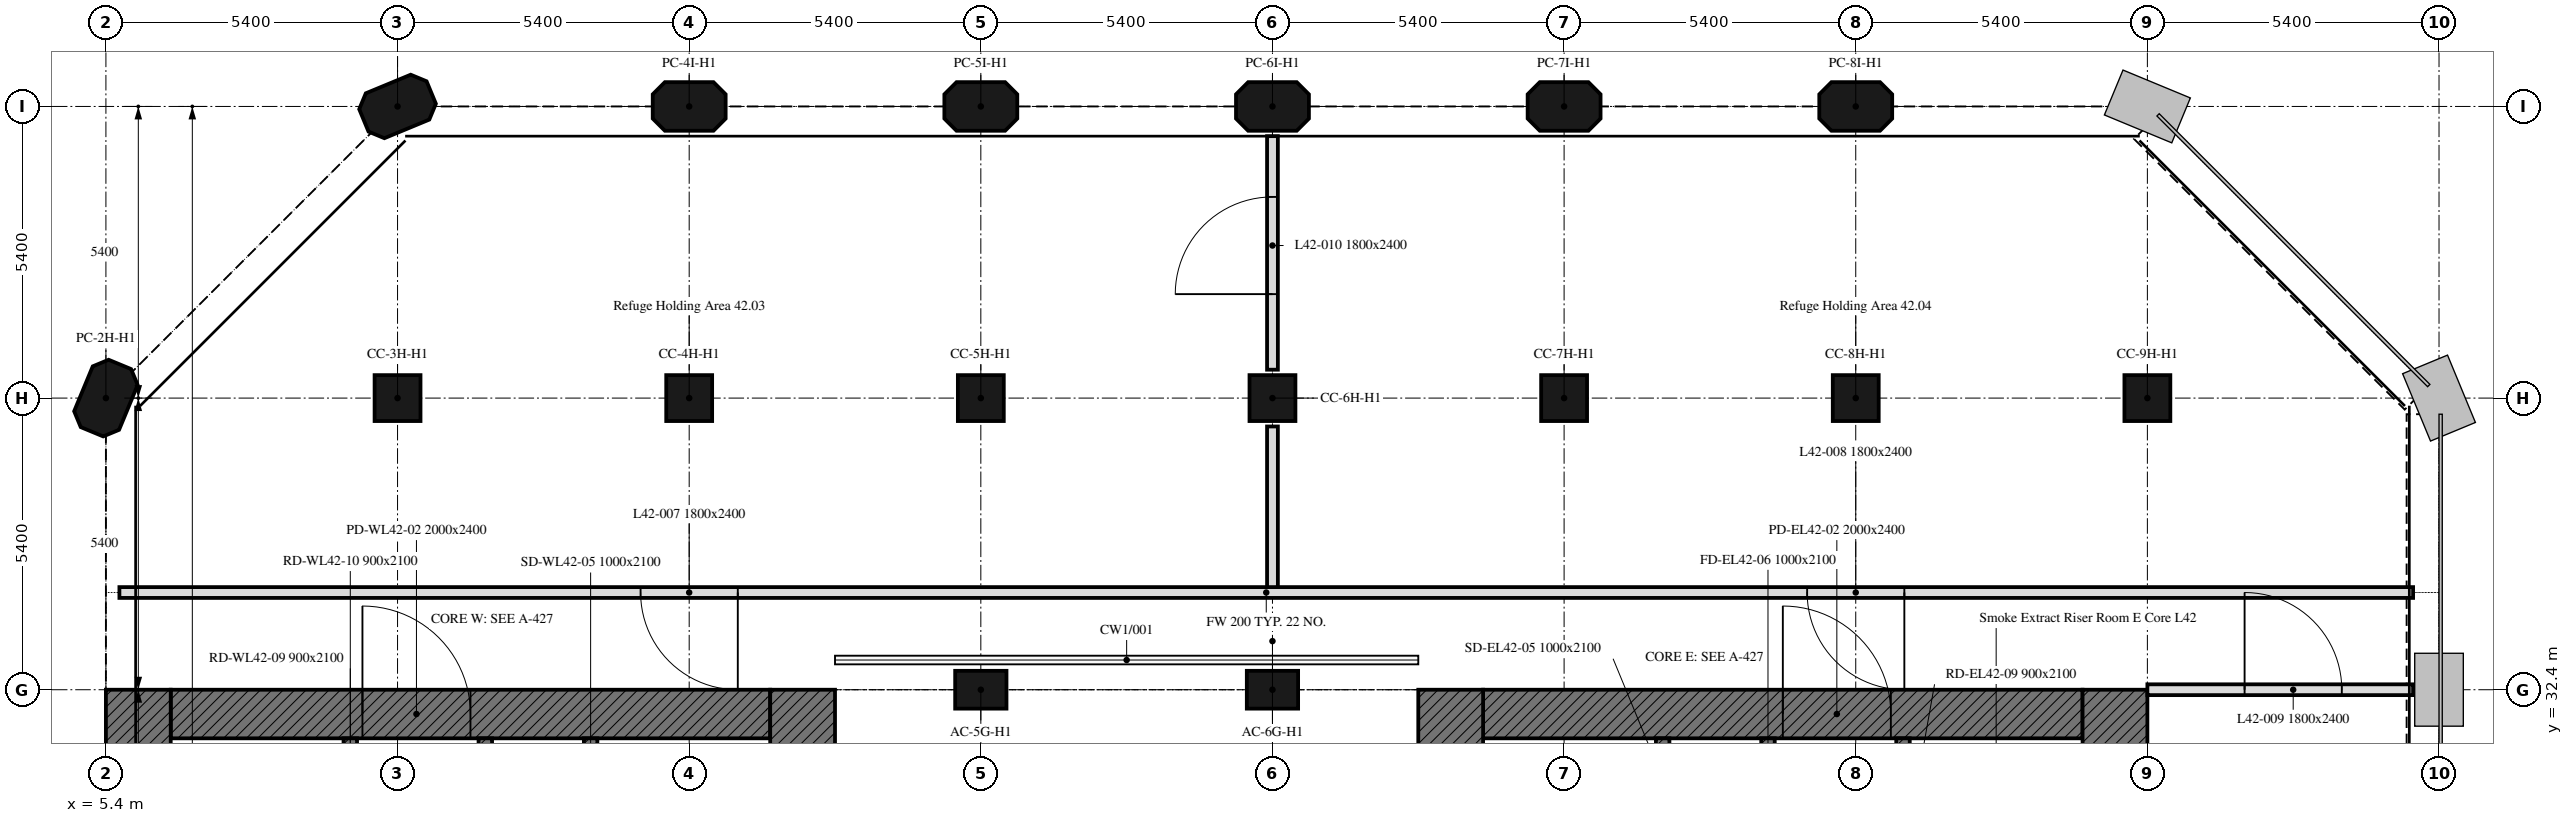
"""IFC4 building model, lengths in metres.
Left out: names, types, materials, properties, quantities, classifications, styles, units other than length and angle.
Written with IfcOpenShell. Run it as: python <this file> out.ifc"""

import sys

from ifc_helpers import new_model, si_unit, direction, frame, frame_2d, origin, origin_2d, place, context, subcontext, project, spatial, polyline, rectangle, outline, extrude, element, fill, save


model = new_model("IFC4")
c1 = context("Model", 3, precision=1e-05, world=origin(), true_north=direction((0.0, 1.0)))
c2 = subcontext(c1, "Body", "Model", "MODEL_VIEW")
j1 = project(units=[si_unit("LENGTHUNIT", "METRE"), si_unit("PLANEANGLEUNIT", "RADIAN")], contexts=[c1])
p1 = place(None, origin())
s1 = spatial("IfcSite", under=j1, at=p1, CompositionType="ELEMENT")
p2 = place(p1, origin())
s2 = spatial("IfcBuilding", under=s1, at=p2, CompositionType="ELEMENT")
p3 = place(p2, frame((0.0, 0.0, 175.9)))
s3 = spatial("IfcBuildingStorey", under=s2, at=p3, CompositionType="ELEMENT", Elevation=175.9)
for number, where, z_axis, x_axis in (
    (1, (21.6, 32.4, 0.0), (0.0, 0.0, 1.0), (1.0, 0.0, 0.0)),
    (2, (27.0, 32.4, 0.0), (0.0, 0.0, 1.0), (1.0, 0.0, 0.0)),
):
    element("IfcColumn", number, at=place(p3, frame(where, z_axis=z_axis, x_axis=x_axis)), inside=s3, PredefinedType="COLUMN", context=c2, shape_type="SweptSolid", body=[
        extrude(rectangle(XDim=0.95, YDim=0.7, at=origin_2d()), origin(), (0.0, 0.0, 1.0), 4.5),
    ])
p4 = place(p3, frame((5.4, 37.8, 0.0), z_axis=(0.0, 0.0, 1.0), x_axis=(0.382683432365, 0.923879532511, 0.0)))
e3 = element("IfcColumn", 3, at=p4, inside=s3, PredefinedType="COLUMN", context=c2, shape_type="SweptSolid", body=[
    extrude(outline(polyline([(-0.45, -0.45), (0.45, -0.45), (0.675, -0.225), (0.675, 0.225), (0.45, 0.45), (-0.45, 0.45), (-0.675, 0.225), (-0.675, -0.225), (-0.45, -0.45)])), origin(), (0.0, 0.0, 1.0), 4.5),
])
for number, where, z_axis, x_axis in (
    (4, (10.8, 37.8, 0.0), (0.0, 0.0, 1.0), (1.0, 0.0, 0.0)),
    (5, (16.2, 37.8, 0.0), (0.0, 0.0, 1.0), (1.0, 0.0, 0.0)),
    (6, (21.6, 37.8, 0.0), (0.0, 0.0, 1.0), (1.0, 0.0, 0.0)),
    (7, (27.0, 37.8, 0.0), (0.0, 0.0, 1.0), (1.0, 0.0, 0.0)),
    (8, (32.4, 37.8, 0.0), (0.0, 0.0, 1.0), (1.0, 0.0, 0.0)),
    (9, (37.8, 37.8, 0.0), (0.0, 0.0, 1.0), (1.0, 0.0, 0.0)),
    (10, (43.2, 37.8, 0.0), (0.0, 0.0, 1.0), (1.0, 0.0, 0.0)),
):
    element("IfcColumn", number, at=place(p3, frame(where, z_axis=z_axis, x_axis=x_axis)), inside=s3, PredefinedType="COLUMN", context=c2, shape_type="SweptSolid", body=[
        extrude(rectangle(XDim=0.85, YDim=0.85, at=origin_2d()), origin(), (0.0, 0.0, 1.0), 4.5),
    ])
for number, where, z_axis, x_axis in (
    (11, (10.8, 43.2, 0.0), (0.0, 0.0, 1.0), (0.924, 0.383, 0.0)),
    (12, (16.2, 43.2, 0.0), (0.0, 0.0, 1.0), (1.0, 0.0, 0.0)),
    (13, (21.6, 43.2, 0.0), (0.0, 0.0, 1.0), (1.0, 0.0, 0.0)),
    (14, (27.0, 43.2, 0.0), (0.0, 0.0, 1.0), (1.0, 0.0, 0.0)),
    (15, (32.4, 43.2, 0.0), (0.0, 0.0, 1.0), (1.0, 0.0, 0.0)),
    (16, (37.8, 43.2, 0.0), (0.0, 0.0, 1.0), (1.0, 0.0, 0.0)),
):
    element("IfcColumn", number, at=place(p3, frame(where, z_axis=z_axis, x_axis=x_axis)), inside=s3, PredefinedType="COLUMN", context=c2, shape_type="SweptSolid", body=[
        extrude(outline(polyline([(-0.45, -0.45), (0.45, -0.45), (0.675, -0.225), (0.675, 0.225), (0.45, 0.45), (-0.45, 0.45), (-0.675, 0.225), (-0.675, -0.225), (-0.45, -0.45)])), origin(), (0.0, 0.0, 1.0), 4.5),
    ])
p5 = place(p3, frame((6.6, 31.95, 0.0), z_axis=(0.0, 0.0, 1.0), x_axis=(1.0, 0.0, 0.0)))
e17 = element("IfcWall", 17, at=p5, inside=s3, PredefinedType="SOLIDWALL", context=c2, shape_type="SweptSolid", body=[
    extrude(rectangle(XDim=11.1, YDim=0.9, at=frame_2d((5.55, 0.0))), origin(), (0.0, 0.0, 1.0), 4.5),
])
p6 = place(p5, frame((3.55, 0.0, 0.0)))
e18 = element("IfcOpeningElement", 18, at=p6, cuts=e17, PredefinedType="OPENING", context=c2, shape_type="SweptSolid", body=[
    extrude(rectangle(XDim=2.0, YDim=2.4, at=frame_2d((1.0, 1.2))), frame((0.0, 0.45, 0.0), z_axis=(0.0, -1.0, 0.0), x_axis=(1.0, 0.0, 0.0)), (0.0, 0.0, 1.0), 0.9),
])
for number, where, z_axis, x_axis in (
    (19, (6.0, 16.2, 0.0), (0.0, 0.0, 1.0), (0.0, 1.0, 0.0)),
    (20, (18.3, 32.4, 0.0), (0.0, 0.0, 1.0), (0.0, -1.0, 0.0)),
):
    element("IfcWall", number, at=place(p3, frame(where, z_axis=z_axis, x_axis=x_axis)), inside=s3, PredefinedType="SOLIDWALL", context=c2, shape_type="SweptSolid", body=[
        extrude(rectangle(XDim=16.2, YDim=1.2, at=frame_2d((8.1, 0.0))), origin(), (0.0, 0.0, 1.0), 4.5),
    ])
p7 = place(p3, frame((9.925, 17.1, 0.0), z_axis=(0.0, 0.0, 1.0), x_axis=(0.0, 1.0, 0.0)))
e21 = element("IfcWall", 21, at=p7, inside=s3, PredefinedType="SOLIDWALL", context=c2, shape_type="SweptSolid", body=[
    extrude(rectangle(XDim=14.4, YDim=0.25, at=frame_2d((7.2, 0.0))), origin(), (0.0, 0.0, 1.0), 4.5),
])
p8 = place(p7, frame((4.6, 0.0, 0.0)))
e22 = element("IfcOpeningElement", 22, at=p8, cuts=e21, PredefinedType="OPENING", context=c2, shape_type="SweptSolid", body=[
    extrude(rectangle(XDim=1.0, YDim=2.1, at=frame_2d((0.5, 1.05))), frame((0.0, 0.125, 0.0), z_axis=(0.0, -1.0, 0.0), x_axis=(1.0, 0.0, 0.0)), (0.0, 0.0, 1.0), 0.25),
])
p9 = place(p7, frame((7.062, 0.0, 0.0)))
e23 = element("IfcOpeningElement", 23, at=p9, cuts=e21, PredefinedType="OPENING", context=c2, shape_type="SweptSolid", body=[
    extrude(rectangle(XDim=1.2, YDim=2.1, at=frame_2d((0.6, 1.05))), frame((0.0, 0.125, 0.0), z_axis=(0.0, -1.0, 0.0), x_axis=(1.0, 0.0, 0.0)), (0.0, 0.0, 1.0), 0.25),
])
p10 = place(p7, frame((9.853, 0.0, 0.0)))
e24 = element("IfcOpeningElement", 24, at=p10, cuts=e21, PredefinedType="OPENING", context=c2, shape_type="SweptSolid", body=[
    extrude(rectangle(XDim=0.9, YDim=2.1, at=frame_2d((0.45, 1.05))), frame((0.0, 0.125, 0.0), z_axis=(0.0, -1.0, 0.0), x_axis=(1.0, 0.0, 0.0)), (0.0, 0.0, 1.0), 0.25),
])
p11 = place(p7, frame((11.667, 0.0, 0.0)))
e25 = element("IfcOpeningElement", 25, at=p11, cuts=e21, PredefinedType="OPENING", context=c2, shape_type="SweptSolid", body=[
    extrude(rectangle(XDim=0.9, YDim=2.1, at=frame_2d((0.45, 1.05))), frame((0.0, 0.125, 0.0), z_axis=(0.0, -1.0, 0.0), x_axis=(1.0, 0.0, 0.0)), (0.0, 0.0, 1.0), 0.25),
])
p12 = place(p7, frame((13.227, 0.0, 0.0)))
e26 = element("IfcOpeningElement", 26, at=p12, cuts=e21, PredefinedType="OPENING", context=c2, shape_type="SweptSolid", body=[
    extrude(rectangle(XDim=0.9, YDim=2.1, at=frame_2d((0.45, 1.05))), frame((0.0, 0.125, 0.0), z_axis=(0.0, -1.0, 0.0), x_axis=(1.0, 0.0, 0.0)), (0.0, 0.0, 1.0), 0.25),
])
p13 = place(p3, frame((14.375, 17.1, 0.0), z_axis=(0.0, 0.0, 1.0), x_axis=(0.0, 1.0, 0.0)))
e27 = element("IfcWall", 27, at=p13, inside=s3, PredefinedType="SOLIDWALL", context=c2, shape_type="SweptSolid", body=[
    extrude(rectangle(XDim=14.4, YDim=0.25, at=frame_2d((7.2, 0.0))), origin(), (0.0, 0.0, 1.0), 4.5),
])
p14 = place(p13, frame((13.15, 0.0, 0.0)))
e28 = element("IfcOpeningElement", 28, at=p14, cuts=e27, PredefinedType="OPENING", context=c2, shape_type="SweptSolid", body=[
    extrude(rectangle(XDim=1.0, YDim=2.1, at=frame_2d((0.5, 1.05))), frame((0.0, 0.125, 0.0), z_axis=(0.0, -1.0, 0.0), x_axis=(1.0, 0.0, 0.0)), (0.0, 0.0, 1.0), 0.25),
])
p15 = place(p13, frame((3.25, 0.0, 0.0)))
e29 = element("IfcOpeningElement", 29, at=p15, cuts=e27, PredefinedType="OPENING", context=c2, shape_type="SweptSolid", body=[
    extrude(rectangle(XDim=0.9, YDim=2.1, at=frame_2d((0.45, 1.05))), frame((0.0, 0.125, 0.0), z_axis=(0.0, -1.0, 0.0), x_axis=(1.0, 0.0, 0.0)), (0.0, 0.0, 1.0), 0.25),
])
p16 = place(p3, frame((12.425, 29.4, 0.0), z_axis=(0.0, 0.0, 1.0), x_axis=(0.0, 1.0, 0.0)))
e30 = element("IfcWall", 30, at=p16, inside=s3, PredefinedType="SOLIDWALL", context=c2, shape_type="SweptSolid", body=[
    extrude(rectangle(XDim=2.1, YDim=0.25, at=frame_2d((1.05, 0.0))), origin(), (0.0, 0.0, 1.0), 4.5),
])
p17 = place(p16, frame((0.5, 0.0, 0.0)))
e31 = element("IfcOpeningElement", 31, at=p17, cuts=e30, PredefinedType="OPENING", context=c2, shape_type="SweptSolid", body=[
    extrude(rectangle(XDim=1.0, YDim=2.1, at=frame_2d((0.5, 1.05))), frame((0.0, 0.125, 0.0), z_axis=(0.0, -1.0, 0.0), x_axis=(1.0, 0.0, 0.0)), (0.0, 0.0, 1.0), 0.25),
])
p18 = place(p3, frame((30.9, 31.95, 0.0), z_axis=(0.0, 0.0, 1.0), x_axis=(1.0, 0.0, 0.0)))
e32 = element("IfcWall", 32, at=p18, inside=s3, PredefinedType="SOLIDWALL", context=c2, shape_type="SweptSolid", body=[
    extrude(rectangle(XDim=11.1, YDim=0.9, at=frame_2d((5.55, 0.0))), origin(), (0.0, 0.0, 1.0), 4.5),
])
p19 = place(p18, frame((5.55, 0.0, 0.0)))
e33 = element("IfcOpeningElement", 33, at=p19, cuts=e32, PredefinedType="OPENING", context=c2, shape_type="SweptSolid", body=[
    extrude(rectangle(XDim=2.0, YDim=2.4, at=frame_2d((1.0, 1.2))), frame((0.0, 0.45, 0.0), z_axis=(0.0, -1.0, 0.0), x_axis=(1.0, 0.0, 0.0)), (0.0, 0.0, 1.0), 0.9),
])
for number, where, z_axis, x_axis in (
    (34, (42.6, 32.4, 0.0), (0.0, 0.0, 1.0), (0.0, -1.0, 0.0)),
    (35, (30.3, 16.2, 0.0), (0.0, 0.0, 1.0), (0.0, 1.0, 0.0)),
):
    element("IfcWall", number, at=place(p3, frame(where, z_axis=z_axis, x_axis=x_axis)), inside=s3, PredefinedType="SOLIDWALL", context=c2, shape_type="SweptSolid", body=[
        extrude(rectangle(XDim=16.2, YDim=1.2, at=frame_2d((8.1, 0.0))), origin(), (0.0, 0.0, 1.0), 4.5),
    ])
p20 = place(p3, frame((38.675, 17.1, 0.0), z_axis=(0.0, 0.0, 1.0), x_axis=(0.0, 1.0, 0.0)))
e36 = element("IfcWall", 36, at=p20, inside=s3, PredefinedType="SOLIDWALL", context=c2, shape_type="SweptSolid", body=[
    extrude(rectangle(XDim=14.4, YDim=0.25, at=frame_2d((7.2, 0.0))), origin(), (0.0, 0.0, 1.0), 4.5),
])
p21 = place(p20, frame((4.6, 0.0, 0.0)))
e37 = element("IfcOpeningElement", 37, at=p21, cuts=e36, PredefinedType="OPENING", context=c2, shape_type="SweptSolid", body=[
    extrude(rectangle(XDim=1.0, YDim=2.1, at=frame_2d((0.5, 1.05))), frame((0.0, 0.125, 0.0), z_axis=(0.0, -1.0, 0.0), x_axis=(1.0, 0.0, 0.0)), (0.0, 0.0, 1.0), 0.25),
])
p22 = place(p20, frame((7.062, 0.0, 0.0)))
e38 = element("IfcOpeningElement", 38, at=p22, cuts=e36, PredefinedType="OPENING", context=c2, shape_type="SweptSolid", body=[
    extrude(rectangle(XDim=1.2, YDim=2.1, at=frame_2d((0.6, 1.05))), frame((0.0, 0.125, 0.0), z_axis=(0.0, -1.0, 0.0), x_axis=(1.0, 0.0, 0.0)), (0.0, 0.0, 1.0), 0.25),
])
p23 = place(p20, frame((9.853, 0.0, 0.0)))
e39 = element("IfcOpeningElement", 39, at=p23, cuts=e36, PredefinedType="OPENING", context=c2, shape_type="SweptSolid", body=[
    extrude(rectangle(XDim=0.9, YDim=2.1, at=frame_2d((0.45, 1.05))), frame((0.0, 0.125, 0.0), z_axis=(0.0, -1.0, 0.0), x_axis=(1.0, 0.0, 0.0)), (0.0, 0.0, 1.0), 0.25),
])
p24 = place(p20, frame((11.667, 0.0, 0.0)))
e40 = element("IfcOpeningElement", 40, at=p24, cuts=e36, PredefinedType="OPENING", context=c2, shape_type="SweptSolid", body=[
    extrude(rectangle(XDim=0.9, YDim=2.1, at=frame_2d((0.45, 1.05))), frame((0.0, 0.125, 0.0), z_axis=(0.0, -1.0, 0.0), x_axis=(1.0, 0.0, 0.0)), (0.0, 0.0, 1.0), 0.25),
])
p25 = place(p20, frame((13.227, 0.0, 0.0)))
e41 = element("IfcOpeningElement", 41, at=p25, cuts=e36, PredefinedType="OPENING", context=c2, shape_type="SweptSolid", body=[
    extrude(rectangle(XDim=0.9, YDim=2.1, at=frame_2d((0.45, 1.05))), frame((0.0, 0.125, 0.0), z_axis=(0.0, -1.0, 0.0), x_axis=(1.0, 0.0, 0.0)), (0.0, 0.0, 1.0), 0.25),
])
p26 = place(p3, frame((34.225, 17.1, 0.0), z_axis=(0.0, 0.0, 1.0), x_axis=(0.0, 1.0, 0.0)))
e42 = element("IfcWall", 42, at=p26, inside=s3, PredefinedType="SOLIDWALL", context=c2, shape_type="SweptSolid", body=[
    extrude(rectangle(XDim=14.4, YDim=0.25, at=frame_2d((7.2, 0.0))), origin(), (0.0, 0.0, 1.0), 4.5),
])
p27 = place(p26, frame((13.15, 0.0, 0.0)))
e43 = element("IfcOpeningElement", 43, at=p27, cuts=e42, PredefinedType="OPENING", context=c2, shape_type="SweptSolid", body=[
    extrude(rectangle(XDim=1.0, YDim=2.1, at=frame_2d((0.5, 1.05))), frame((0.0, 0.125, 0.0), z_axis=(0.0, -1.0, 0.0), x_axis=(1.0, 0.0, 0.0)), (0.0, 0.0, 1.0), 0.25),
])
p28 = place(p26, frame((3.25, 0.0, 0.0)))
e44 = element("IfcOpeningElement", 44, at=p28, cuts=e42, PredefinedType="OPENING", context=c2, shape_type="SweptSolid", body=[
    extrude(rectangle(XDim=0.9, YDim=2.1, at=frame_2d((0.45, 1.05))), frame((0.0, 0.125, 0.0), z_axis=(0.0, -1.0, 0.0), x_axis=(1.0, 0.0, 0.0)), (0.0, 0.0, 1.0), 0.25),
])
p29 = place(p3, frame((36.175, 29.4, 0.0), z_axis=(0.0, 0.0, 1.0), x_axis=(0.0, 1.0, 0.0)))
e45 = element("IfcWall", 45, at=p29, inside=s3, PredefinedType="SOLIDWALL", context=c2, shape_type="SweptSolid", body=[
    extrude(rectangle(XDim=2.1, YDim=0.25, at=frame_2d((1.05, 0.0))), origin(), (0.0, 0.0, 1.0), 4.5),
])
p30 = place(p29, frame((0.5, 0.0, 0.0)))
e46 = element("IfcOpeningElement", 46, at=p30, cuts=e45, PredefinedType="OPENING", context=c2, shape_type="SweptSolid", body=[
    extrude(rectangle(XDim=1.0, YDim=2.1, at=frame_2d((0.5, 1.05))), frame((0.0, 0.125, 0.0), z_axis=(0.0, -1.0, 0.0), x_axis=(1.0, 0.0, 0.0)), (0.0, 0.0, 1.0), 0.25),
])
p31 = place(p3, frame((48.12, 34.2, 0.0), z_axis=(0.0, 0.0, 1.0), x_axis=(-1.0, 0.0, 0.0)))
e47 = element("IfcWall", 47, at=p31, inside=s3, PredefinedType="PARTITIONING", context=c2, shape_type="SweptSolid", body=[
    extrude(rectangle(XDim=42.47, YDim=0.2, at=frame_2d((21.235, 0.0))), origin(), (0.0, 0.0, 1.0), 3.9),
])
p32 = place(p31, frame((31.02, 0.0, 0.0)))
e48 = element("IfcOpeningElement", 48, at=p32, cuts=e47, PredefinedType="OPENING", context=c2, shape_type="SweptSolid", body=[
    extrude(rectangle(XDim=1.8, YDim=2.4, at=frame_2d((0.9, 1.2))), frame((0.0, 0.1, 0.0), z_axis=(0.0, -1.0, 0.0), x_axis=(1.0, 0.0, 0.0)), (0.0, 0.0, 1.0), 0.2),
])
p33 = place(p31, frame((9.42, 0.0, 0.0)))
e49 = element("IfcOpeningElement", 49, at=p33, cuts=e47, PredefinedType="OPENING", context=c2, shape_type="SweptSolid", body=[
    extrude(rectangle(XDim=1.8, YDim=2.4, at=frame_2d((0.9, 1.2))), frame((0.0, 0.1, 0.0), z_axis=(0.0, -1.0, 0.0), x_axis=(1.0, 0.0, 0.0)), (0.0, 0.0, 1.0), 0.2),
])
p34 = place(p3, frame((43.2, 32.4, 0.0), z_axis=(0.0, 0.0, 1.0), x_axis=(1.0, 0.0, 0.0)))
e50 = element("IfcWall", 50, at=p34, inside=s3, PredefinedType="PARTITIONING", context=c2, shape_type="SweptSolid", body=[
    extrude(rectangle(XDim=4.92, YDim=0.2, at=frame_2d((2.46, 0.0))), origin(), (0.0, 0.0, 1.0), 3.9),
])
p35 = place(p34, frame((1.8, 0.0, 0.0)))
e51 = element("IfcOpeningElement", 51, at=p35, cuts=e50, PredefinedType="OPENING", context=c2, shape_type="SweptSolid", body=[
    extrude(rectangle(XDim=1.8, YDim=2.4, at=frame_2d((0.9, 1.2))), frame((0.0, 0.1, 0.0), z_axis=(0.0, -1.0, 0.0), x_axis=(1.0, 0.0, 0.0)), (0.0, 0.0, 1.0), 0.2),
])
p36 = place(p3, frame((27.0, 34.3, 0.0), z_axis=(0.0, 0.0, 1.0), x_axis=(0.0, 1.0, 0.0)))
e52 = element("IfcWall", 52, at=p36, inside=s3, PredefinedType="PARTITIONING", context=c2, shape_type="SweptSolid", body=[
    extrude(rectangle(XDim=2.974, YDim=0.2, at=frame_2d((1.487, 0.0))), origin(), (0.0, 0.0, 1.0), 3.9),
])
p37 = place(p3, frame((27.0, 38.326, 0.0), z_axis=(0.0, 0.0, 1.0), x_axis=(0.0, 1.0, 0.0)))
e53 = element("IfcWall", 53, at=p37, inside=s3, PredefinedType="PARTITIONING", context=c2, shape_type="SweptSolid", body=[
    extrude(rectangle(XDim=4.324, YDim=0.2, at=frame_2d((2.162, 0.0))), origin(), (0.0, 0.0, 1.0), 3.9),
])
p38 = place(p37, frame((1.399, 0.0, 0.0)))
e54 = element("IfcOpeningElement", 54, at=p38, cuts=e53, PredefinedType="OPENING", context=c2, shape_type="SweptSolid", body=[
    extrude(rectangle(XDim=1.8, YDim=2.4, at=frame_2d((0.9, 1.2))), frame((0.0, 0.1, 0.0), z_axis=(0.0, -1.0, 0.0), x_axis=(1.0, 0.0, 0.0)), (0.0, 0.0, 1.0), 0.2),
])
p39 = place(p6, origin())
e55 = element("IfcDoor", 55, at=p39, inside=s3, OperationType="DOUBLE_DOOR_SINGLE_SWING", PredefinedType="DOOR", context=c2, shape_type="SweptSolid", body=[
    extrude(rectangle(XDim=2.0, YDim=2.4, at=frame_2d((1.0, 1.2))), frame((0.0, 0.025, 0.0), z_axis=(0.0, -1.0, 0.0), x_axis=(1.0, 0.0, 0.0)), (0.0, 0.0, 1.0), 0.05),
])
fill(e18, e55)
p40 = place(p19, origin())
e56 = element("IfcDoor", 56, at=p40, inside=s3, OperationType="DOUBLE_DOOR_SINGLE_SWING", PredefinedType="DOOR", context=c2, shape_type="SweptSolid", body=[
    extrude(rectangle(XDim=2.0, YDim=2.4, at=frame_2d((1.0, 1.2))), frame((0.0, 0.025, 0.0), z_axis=(0.0, -1.0, 0.0), x_axis=(1.0, 0.0, 0.0)), (0.0, 0.0, 1.0), 0.05),
])
fill(e33, e56)
p41 = place(p32, origin())
e57 = element("IfcDoor", 57, at=p41, inside=s3, OperationType="DOUBLE_DOOR_SINGLE_SWING", PredefinedType="DOOR", context=c2, shape_type="SweptSolid", body=[
    extrude(rectangle(XDim=1.8, YDim=2.4, at=frame_2d((0.9, 1.2))), frame((0.0, 0.025, 0.0), z_axis=(0.0, -1.0, 0.0), x_axis=(1.0, 0.0, 0.0)), (0.0, 0.0, 1.0), 0.05),
])
fill(e48, e57)
p42 = place(p33, origin())
e58 = element("IfcDoor", 58, at=p42, inside=s3, OperationType="DOUBLE_DOOR_SINGLE_SWING", PredefinedType="DOOR", context=c2, shape_type="SweptSolid", body=[
    extrude(rectangle(XDim=1.8, YDim=2.4, at=frame_2d((0.9, 1.2))), frame((0.0, 0.025, 0.0), z_axis=(0.0, -1.0, 0.0), x_axis=(1.0, 0.0, 0.0)), (0.0, 0.0, 1.0), 0.05),
])
fill(e49, e58)
p43 = place(p35, origin())
e59 = element("IfcDoor", 59, at=p43, inside=s3, OperationType="DOUBLE_DOOR_SINGLE_SWING", PredefinedType="DOOR", context=c2, shape_type="SweptSolid", body=[
    extrude(rectangle(XDim=1.8, YDim=2.4, at=frame_2d((0.9, 1.2))), frame((0.0, 0.025, 0.0), z_axis=(0.0, -1.0, 0.0), x_axis=(1.0, 0.0, 0.0)), (0.0, 0.0, 1.0), 0.05),
])
fill(e51, e59)
p44 = place(p38, origin())
e60 = element("IfcDoor", 60, at=p44, inside=s3, OperationType="DOUBLE_DOOR_SINGLE_SWING", PredefinedType="DOOR", context=c2, shape_type="SweptSolid", body=[
    extrude(rectangle(XDim=1.8, YDim=2.4, at=frame_2d((0.9, 1.2))), frame((0.0, 0.025, 0.0), z_axis=(0.0, -1.0, 0.0), x_axis=(1.0, 0.0, 0.0)), (0.0, 0.0, 1.0), 0.05),
])
fill(e54, e60)
save(model, sys.argv[1])
